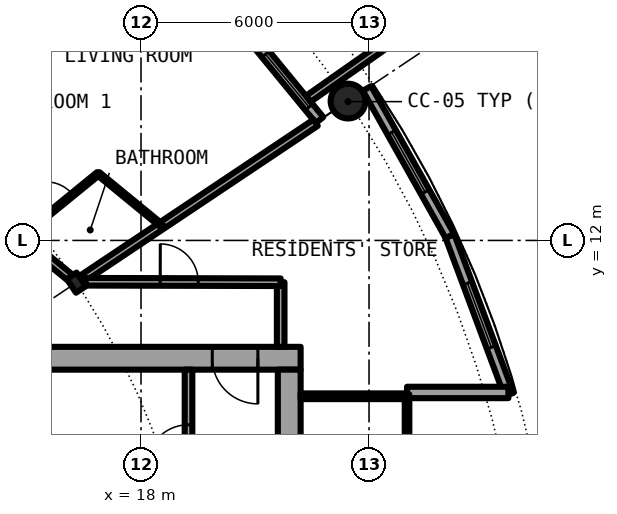
"""IFC4 building model, lengths in metres.
Left out: names, types, materials, properties, quantities, classifications, styles, units other than length and angle.
Written with IfcOpenShell. Run it as: python <this file> out.ifc"""

import sys

from ifc_helpers import new_model, si_unit, direction, frame, frame_2d, origin, origin_2d, place, context, subcontext, project, spatial, rectangle, hollow_circle, i_section, extrude, element, fill, save


model = new_model("IFC4")
c1 = context("Model", 3, precision=1e-05, world=origin(), true_north=direction((0.0, 1.0)))
c2 = subcontext(c1, "Body", "Model", "MODEL_VIEW")
j1 = project(units=[si_unit("LENGTHUNIT", "METRE"), si_unit("PLANEANGLEUNIT", "RADIAN")], contexts=[c1])
p1 = place(None, origin())
s1 = spatial("IfcSite", under=j1, at=p1, CompositionType="ELEMENT")
p2 = place(p1, origin())
s2 = spatial("IfcBuilding", under=s1, at=p2, CompositionType="ELEMENT")
p3 = place(p2, frame((0.0, 0.0, 111.65)))
s3 = spatial("IfcBuildingStorey", under=s2, at=p3, CompositionType="ELEMENT", Elevation=111.65)
p4 = place(p3, frame((23.448, 15.667, 0.0), z_axis=(0.0, 0.0, 1.0), x_axis=(1.0, 0.0, 0.0)))
e1 = element("IfcColumn", 1, at=p4, inside=s3, PredefinedType="COLUMN", context=c2, shape_type="SweptSolid", body=[
    extrude(hollow_circle(Radius=0.457, WallThickness=0.04, at=origin_2d()), origin(), (0.0, 0.0, 1.0), 3.05),
])
p5 = place(p3, frame((16.297, 10.889, 0.0), z_axis=(0.0, 0.0, 1.0), x_axis=(0.831469612303, 0.55557023302, 0.0)))
e2 = element("IfcColumn", 2, at=p5, inside=s3, PredefinedType="COLUMN", context=c2, shape_type="SweptSolid", body=[
    extrude(i_section(OverallWidth=0.307, OverallDepth=0.432, WebThickness=0.021, FlangeThickness=0.04, FilletRadius=0.027, at=origin_2d()), origin(), (0.0, 0.0, 1.0), 3.05),
])
p6 = place(p3, frame((22.699, 15.167, 0.0), z_axis=(0.0, 0.0, 1.0), x_axis=(-0.634382322723, 0.773019449054, 0.0)))
e3 = element("IfcWall", 3, at=p6, inside=s3, PredefinedType="SOLIDWALL", context=c2, shape_type="SweptSolid", body=[
    extrude(rectangle(XDim=5.352, YDim=0.25, at=frame_2d((2.676, 0.0))), origin(), (0.0, 0.0, 1.0), 2.7),
])
p7 = place(p6, frame((0.441, 0.0, 0.3)))
e4 = element("IfcOpeningElement", 4, at=p7, cuts=e3, PredefinedType="OPENING", context=c2, shape_type="SweptSolid", body=[
    extrude(rectangle(XDim=1.8, YDim=2.1, at=frame_2d((0.9, 1.05))), frame((0.0, 0.135, 0.0), z_axis=(0.0, -1.0, 0.0), x_axis=(1.0, 0.0, 0.0)), (0.0, 0.0, 1.0), 0.27),
])
p8 = place(p6, frame((3.51, 0.0, 0.0)))
e5 = element("IfcOpeningElement", 5, at=p8, cuts=e3, PredefinedType="OPENING", context=c2, shape_type="SweptSolid", body=[
    extrude(rectangle(XDim=1.0, YDim=2.2, at=frame_2d((0.5, 1.1))), frame((0.0, 0.135, 0.0), z_axis=(0.0, -1.0, 0.0), x_axis=(1.0, 0.0, 0.0)), (0.0, 0.0, 1.0), 0.27),
])
p9 = place(p3, frame((22.402, 15.726, -0.03), z_axis=(0.0, 0.0, 1.0), x_axis=(0.818275399393, 0.574826383135, 0.0)))
e6 = element("IfcWall", 6, at=p9, inside=s3, PredefinedType="SOLIDWALL", context=c2, shape_type="SweptSolid", body=[
    extrude(rectangle(XDim=2.929, YDim=0.2, at=frame_2d((1.465, 0.0))), origin(), (0.0, 0.0, 1.0), 2.73),
])
p10 = place(p3, frame((27.682, 7.945, 0.0), z_axis=(0.0, 0.0, 1.0), x_axis=(-0.349247811493, 0.937030397675, 0.0)))
e7 = element("IfcWall", 7, at=p10, inside=s3, PredefinedType="SOLIDWALL", context=c2, shape_type="SweptSolid", body=[
    extrude(rectangle(XDim=4.452, YDim=0.25, at=frame_2d((2.226, 0.0))), origin(), (0.0, 0.0, 1.0), 2.7),
])
p11 = place(p10, frame((1.327, 0.0, 0.3)))
e8 = element("IfcOpeningElement", 8, at=p11, cuts=e7, PredefinedType="OPENING", context=c2, shape_type="SweptSolid", body=[
    extrude(rectangle(XDim=1.8, YDim=2.1, at=frame_2d((0.9, 1.05))), frame((0.0, 0.135, 0.0), z_axis=(0.0, -1.0, 0.0), x_axis=(1.0, 0.0, 0.0)), (0.0, 0.0, 1.0), 0.27),
])
p12 = place(p3, frame((26.127, 12.117, 0.0), z_axis=(0.0, 0.0, 1.0), x_axis=(-0.489696356642, 0.871893042919, 0.0)))
e9 = element("IfcWall", 9, at=p12, inside=s3, PredefinedType="SOLIDWALL", context=c2, shape_type="SweptSolid", body=[
    extrude(rectangle(XDim=4.454, YDim=0.25, at=frame_2d((2.227, 0.0))), origin(), (0.0, 0.0, 1.0), 2.7),
])
p13 = place(p12, frame((1.327, 0.0, 0.3)))
e10 = element("IfcOpeningElement", 10, at=p13, cuts=e9, PredefinedType="OPENING", context=c2, shape_type="SweptSolid", body=[
    extrude(rectangle(XDim=1.8, YDim=2.1, at=frame_2d((0.9, 1.05))), frame((0.0, 0.135, 0.0), z_axis=(0.0, -1.0, 0.0), x_axis=(1.0, 0.0, 0.0)), (0.0, 0.0, 1.0), 0.27),
])
p14 = place(p3, frame((25.0, 8.0, 0.0), z_axis=(0.0, 0.0, 1.0), x_axis=(1.0, 0.0, 0.0)))
e11 = element("IfcWall", 11, at=p14, inside=s3, PredefinedType="SOLIDWALL", context=c2, shape_type="SweptSolid", body=[
    extrude(rectangle(XDim=2.667, YDim=0.3, at=frame_2d((1.333, 0.0))), origin(), (0.0, 0.0, 1.0), 2.7),
])
p15 = place(p3, frame((22.2, 8.9, 0.0), z_axis=(0.0, 0.0, 1.0), x_axis=(-1.0, 0.0, 0.0)))
e12 = element("IfcWall", 12, at=p15, inside=s3, PredefinedType="SHEAR", context=c2, shape_type="SweptSolid", body=[
    extrude(rectangle(XDim=13.8, YDim=0.6, at=frame_2d((6.9, 0.0))), origin(), (0.0, 0.0, 1.0), 3.05),
])
p16 = place(p15, frame((1.125, 0.0, 0.0)))
e13 = element("IfcOpeningElement", 13, at=p16, cuts=e12, PredefinedType="OPENING", context=c2, shape_type="SweptSolid", body=[
    extrude(rectangle(XDim=1.2, YDim=2.3, at=frame_2d((0.6, 1.15))), frame((0.0, 0.31, 0.0), z_axis=(0.0, -1.0, 0.0), x_axis=(1.0, 0.0, 0.0)), (0.0, 0.0, 1.0), 0.62),
])
p17 = place(p3, frame((21.9, 8.6, 0.0), z_axis=(0.0, 0.0, 1.0), x_axis=(0.0, -1.0, 0.0)))
e14 = element("IfcWall", 14, at=p17, inside=s3, PredefinedType="SHEAR", context=c2, shape_type="SweptSolid", body=[
    extrude(rectangle(XDim=17.2, YDim=0.6, at=frame_2d((8.6, 0.0))), origin(), (0.0, 0.0, 1.0), 3.05),
])
p18 = place(p17, frame((7.7, 0.0, 0.0)))
e15 = element("IfcOpeningElement", 15, at=p18, cuts=e14, PredefinedType="OPENING", context=c2, shape_type="SweptSolid", body=[
    extrude(rectangle(XDim=1.8, YDim=2.3, at=frame_2d((0.9, 1.15))), frame((0.0, 0.31, 0.0), z_axis=(0.0, -1.0, 0.0), x_axis=(1.0, 0.0, 0.0)), (0.0, 0.0, 1.0), 0.62),
])
p19 = place(p3, frame((19.25, 1.575, 0.0), z_axis=(0.0, 0.0, 1.0), x_axis=(0.0, 1.0, 0.0)))
e16 = element("IfcWall", 16, at=p19, inside=s3, PredefinedType="SOLIDWALL", context=c2, shape_type="SweptSolid", body=[
    extrude(rectangle(XDim=7.025, YDim=0.2, at=frame_2d((3.513, 0.0))), origin(), (0.0, 0.0, 1.0), 2.7),
])
p20 = place(p19, frame((4.475, 0.0, 0.0)))
e17 = element("IfcOpeningElement", 17, at=p20, cuts=e16, PredefinedType="OPENING", context=c2, shape_type="SweptSolid", body=[
    extrude(rectangle(XDim=1.1, YDim=2.3, at=frame_2d((0.55, 1.15))), frame((0.0, 0.11, 0.0), z_axis=(0.0, -1.0, 0.0), x_axis=(1.0, 0.0, 0.0)), (0.0, 0.0, 1.0), 0.22),
])
p21 = place(p3, frame((22.2, 7.9, 0.0), z_axis=(0.0, 0.0, 1.0), x_axis=(1.0, 0.0, 0.0)))
e18 = element("IfcWall", 18, at=p21, inside=s3, PredefinedType="PARTITIONING", context=c2, shape_type="SweptSolid", body=[
    extrude(rectangle(XDim=2.74, YDim=0.15, at=frame_2d((1.37, 0.0))), origin(), (0.0, 0.0, 1.0), 2.7),
])
p22 = place(p3, frame((25.0, -7.95, 0.0), z_axis=(0.0, 0.0, 1.0), x_axis=(0.0, 1.0, 0.0)))
e19 = element("IfcWall", 19, at=p22, inside=s3, PredefinedType="PARTITIONING", context=c2, shape_type="SweptSolid", body=[
    extrude(rectangle(XDim=15.9, YDim=0.12, at=frame_2d((7.95, 0.0))), origin(), (0.0, 0.0, 1.0), 2.7),
])
p23 = place(p22, frame((0.95, 0.0, 0.1)))
e20 = element("IfcOpeningElement", 20, at=p23, cuts=e19, PredefinedType="OPENING", context=c2, shape_type="SweptSolid", body=[
    extrude(rectangle(XDim=14.0, YDim=2.35, at=frame_2d((7.0, 1.175))), frame((0.0, 0.07, 0.0), z_axis=(0.0, -1.0, 0.0), x_axis=(1.0, 0.0, 0.0)), (0.0, 0.0, 1.0), 0.14),
])
p24 = place(p3, frame((21.675, 9.2, 0.0), z_axis=(0.0, 0.0, 1.0), x_axis=(0.0, 1.0, 0.0)))
e21 = element("IfcWall", 21, at=p24, inside=s3, PredefinedType="PARTITIONING", context=c2, shape_type="SweptSolid", body=[
    extrude(rectangle(XDim=1.7, YDim=0.2, at=frame_2d((0.85, 0.0))), origin(), (0.0, 0.0, 1.0), 2.7),
])
p25 = place(p3, frame((11.9, 14.498, 0.0), z_axis=(0.0, 0.0, 1.0), x_axis=(0.634465454582, 0.772951218993, 0.0)))
e22 = element("IfcWall", 22, at=p25, inside=s3, PredefinedType="PARTITIONING", context=c2, shape_type="SweptSolid", body=[
    extrude(rectangle(XDim=8.42, YDim=0.1, at=frame_2d((4.21, 0.0))), origin(), (0.0, 0.0, 1.0), 2.7),
])
p26 = place(p25, frame((0.84, 0.0, 0.0)))
e23 = element("IfcOpeningElement", 23, at=p26, cuts=e22, PredefinedType="OPENING", context=c2, shape_type="SweptSolid", body=[
    extrude(rectangle(XDim=0.9, YDim=2.3, at=frame_2d((0.45, 1.15))), frame((0.0, 0.06, 0.0), z_axis=(0.0, -1.0, 0.0), x_axis=(1.0, 0.0, 0.0)), (0.0, 0.0, 1.0), 0.12),
])
p27 = place(p25, frame((5.051, 0.0, 0.0)))
e24 = element("IfcOpeningElement", 24, at=p27, cuts=e22, PredefinedType="OPENING", context=c2, shape_type="SweptSolid", body=[
    extrude(rectangle(XDim=0.9, YDim=2.3, at=frame_2d((0.45, 1.15))), frame((0.0, 0.06, 0.0), z_axis=(0.0, -1.0, 0.0), x_axis=(1.0, 0.0, 0.0)), (0.0, 0.0, 1.0), 0.12),
])
p28 = place(p3, frame((14.831, 12.092, 0.0), z_axis=(0.0, 0.0, 1.0), x_axis=(0.774979608522, 0.631986239072, 0.0)))
e25 = element("IfcWall", 25, at=p28, inside=s3, PredefinedType="PARTITIONING", context=c2, shape_type="SweptSolid", body=[
    extrude(rectangle(XDim=2.636, YDim=0.1, at=frame_2d((1.318, 0.0))), origin(), (0.0, 0.0, 1.0), 2.7),
])
p29 = place(p28, frame((0.868, 0.0, 0.0)))
e26 = element("IfcOpeningElement", 26, at=p29, cuts=e25, PredefinedType="OPENING", context=c2, shape_type="SweptSolid", body=[
    extrude(rectangle(XDim=0.9, YDim=2.3, at=frame_2d((0.45, 1.15))), frame((0.0, 0.06, 0.0), z_axis=(0.0, -1.0, 0.0), x_axis=(1.0, 0.0, 0.0)), (0.0, 0.0, 1.0), 0.12),
])
p30 = place(p3, frame((16.477, 11.009, 0.0), z_axis=(0.0, 0.0, 1.0), x_axis=(0.831406593008, 0.555664536482, 0.0)))
e27 = element("IfcWall", 27, at=p30, inside=s3, PredefinedType="PARTITIONING", context=c2, shape_type="SweptSolid", body=[
    extrude(rectangle(XDim=7.358, YDim=0.2, at=frame_2d((3.679, 0.0))), origin(), (0.0, 0.0, 1.0), 2.7),
])
p31 = place(p3, frame((16.54, 10.913, 0.0), z_axis=(0.0, 0.0, 1.0), x_axis=(0.99999670426, -0.002567385634, 0.0)))
e28 = element("IfcWall", 28, at=p31, inside=s3, PredefinedType="PARTITIONING", context=c2, shape_type="SweptSolid", body=[
    extrude(rectangle(XDim=5.135, YDim=0.2, at=frame_2d((2.567, 0.0))), origin(), (0.0, 0.0, 1.0), 2.7),
])
p32 = place(p31, frame((1.965, 0.0, 0.0)))
e29 = element("IfcOpeningElement", 29, at=p32, cuts=e28, PredefinedType="OPENING", context=c2, shape_type="SweptSolid", body=[
    extrude(rectangle(XDim=1.0, YDim=2.3, at=frame_2d((0.5, 1.15))), frame((0.0, 0.11, 0.0), z_axis=(0.0, -1.0, 0.0), x_axis=(1.0, 0.0, 0.0)), (0.0, 0.0, 1.0), 0.22),
])
p33 = place(p3, frame((7.5, 18.108, 0.0), z_axis=(0.0, 0.0, 1.0), x_axis=(0.773049018445, -0.634346289562, 0.0)))
e30 = element("IfcWall", 30, at=p33, inside=s3, PredefinedType="PARTITIONING", context=c2, shape_type="SweptSolid", body=[
    extrude(rectangle(XDim=11.219, YDim=0.2, at=frame_2d((5.61, 0.0))), origin(), (0.0, 0.0, 1.0), 2.39),
])
p34 = place(p33, frame((7.085, 0.0, 0.0)))
e31 = element("IfcOpeningElement", 31, at=p34, cuts=e30, PredefinedType="OPENING", context=c2, shape_type="SweptSolid", body=[
    extrude(rectangle(XDim=1.0, YDim=2.3, at=frame_2d((0.5, 1.15))), frame((0.0, 0.11, 0.0), z_axis=(0.0, -1.0, 0.0), x_axis=(1.0, 0.0, 0.0)), (0.0, 0.0, 1.0), 0.22),
])
p35 = place(p3, frame((16.874, 13.758, 0.0), z_axis=(0.0, 0.0, 1.0), x_axis=(0.772948171844, -0.634469166818, 0.0)))
e32 = element("IfcWall", 32, at=p35, inside=s3, PredefinedType="PARTITIONING", context=c2, shape_type="SweptSolid", body=[
    extrude(rectangle(XDim=2.158, YDim=0.1, at=frame_2d((1.079, 0.0))), origin(), (0.0, 0.0, 1.0), 2.7),
])
p36 = place(p7, origin())
e33 = element("IfcWindow", 33, at=p36, inside=s3, PartitioningType="SINGLE_PANEL", PredefinedType="WINDOW", context=c2, shape_type="SweptSolid", body=[
    extrude(rectangle(XDim=1.8, YDim=2.1, at=frame_2d((0.9, 1.05))), frame((0.0, 0.03, 0.0), z_axis=(0.0, -1.0, 0.0), x_axis=(1.0, 0.0, 0.0)), (0.0, 0.0, 1.0), 0.06),
])
fill(e4, e33)
p37 = place(p11, origin())
e34 = element("IfcWindow", 34, at=p37, inside=s3, PartitioningType="SINGLE_PANEL", PredefinedType="WINDOW", context=c2, shape_type="SweptSolid", body=[
    extrude(rectangle(XDim=1.8, YDim=2.1, at=frame_2d((0.9, 1.05))), frame((0.0, 0.03, 0.0), z_axis=(0.0, -1.0, 0.0), x_axis=(1.0, 0.0, 0.0)), (0.0, 0.0, 1.0), 0.06),
])
fill(e8, e34)
p38 = place(p13, origin())
e35 = element("IfcWindow", 35, at=p38, inside=s3, PartitioningType="SINGLE_PANEL", PredefinedType="WINDOW", context=c2, shape_type="SweptSolid", body=[
    extrude(rectangle(XDim=1.8, YDim=2.1, at=frame_2d((0.9, 1.05))), frame((0.0, 0.03, 0.0), z_axis=(0.0, -1.0, 0.0), x_axis=(1.0, 0.0, 0.0)), (0.0, 0.0, 1.0), 0.06),
])
fill(e10, e35)
p39 = place(p20, origin())
e36 = element("IfcDoor", 36, at=p39, inside=s3, OperationType="SINGLE_SWING_LEFT", PredefinedType="DOOR", context=c2, shape_type="SweptSolid", body=[
    extrude(rectangle(XDim=1.1, YDim=2.3, at=frame_2d((0.55, 1.15))), frame((0.0, 0.025, 0.0), z_axis=(0.0, -1.0, 0.0), x_axis=(1.0, 0.0, 0.0)), (0.0, 0.0, 1.0), 0.05),
])
fill(e17, e36)
p40 = place(p16, origin())
e37 = element("IfcDoor", 37, at=p40, inside=s3, OperationType="SINGLE_SWING_RIGHT", PredefinedType="DOOR", context=c2, shape_type="SweptSolid", body=[
    extrude(rectangle(XDim=1.2, YDim=2.3, at=frame_2d((0.6, 1.15))), frame((0.0, 0.025, 0.0), z_axis=(0.0, -1.0, 0.0), x_axis=(1.0, 0.0, 0.0)), (0.0, 0.0, 1.0), 0.05),
])
fill(e13, e37)
p41 = place(p23, origin())
e38 = element("IfcWindow", 38, at=p41, inside=s3, PartitioningType="SINGLE_PANEL", PredefinedType="WINDOW", context=c2, shape_type="SweptSolid", body=[
    extrude(rectangle(XDim=14.0, YDim=2.35, at=frame_2d((7.0, 1.175))), frame((0.0, 0.03, 0.0), z_axis=(0.0, -1.0, 0.0), x_axis=(1.0, 0.0, 0.0)), (0.0, 0.0, 1.0), 0.06),
])
fill(e20, e38)
p42 = place(p29, origin())
e39 = element("IfcDoor", 39, at=p42, inside=s3, OperationType="SINGLE_SWING_RIGHT", PredefinedType="DOOR", context=c2, shape_type="SweptSolid", body=[
    extrude(rectangle(XDim=0.9, YDim=2.3, at=frame_2d((0.45, 1.15))), frame((0.0, 0.025, 0.0), z_axis=(0.0, -1.0, 0.0), x_axis=(1.0, 0.0, 0.0)), (0.0, 0.0, 1.0), 0.05),
])
fill(e26, e39)
p43 = place(p32, origin())
e40 = element("IfcDoor", 40, at=p43, inside=s3, OperationType="SINGLE_SWING_LEFT", PredefinedType="DOOR", context=c2, shape_type="SweptSolid", body=[
    extrude(rectangle(XDim=1.0, YDim=2.3, at=frame_2d((0.5, 1.15))), frame((0.0, 0.025, 0.0), z_axis=(0.0, -1.0, 0.0), x_axis=(1.0, 0.0, 0.0)), (0.0, 0.0, 1.0), 0.05),
])
fill(e29, e40)
save(model, sys.argv[1])
